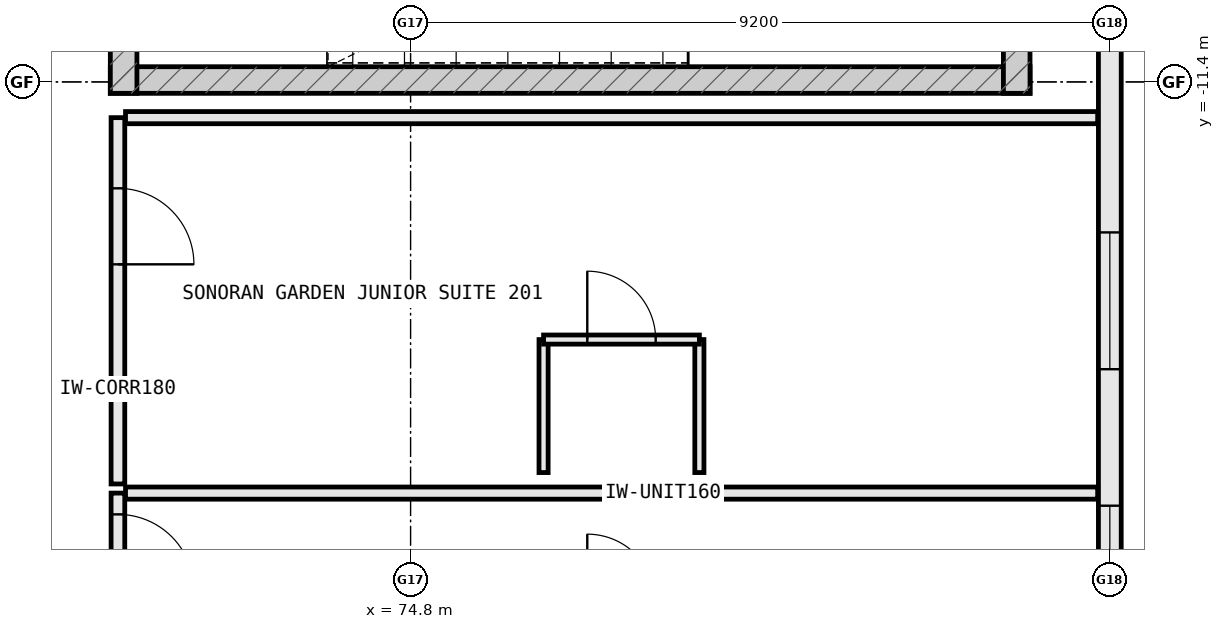
"""IFC4 building model, lengths in metres.
Left out: names, types, materials, properties, quantities, classifications, styles, units other than length and angle.
Written with IfcOpenShell. Run it as: python <this file> out.ifc"""

import sys

from ifc_helpers import new_model, si_unit, direction, frame, frame_2d, origin, place, context, subcontext, project, spatial, rectangle, extrude, element, fill, save


model = new_model("IFC4")
c1 = context("Model", 3, precision=1e-05, world=origin(), true_north=direction((0.0, 1.0)))
c2 = subcontext(c1, "Body", "Model", "MODEL_VIEW")
j1 = project(units=[si_unit("LENGTHUNIT", "METRE"), si_unit("PLANEANGLEUNIT", "RADIAN")], contexts=[c1])
p1 = place(None, origin())
s1 = spatial("IfcSite", under=j1, at=p1, CompositionType="ELEMENT")
p2 = place(p1, origin())
s2 = spatial("IfcBuilding", under=s1, at=p2, CompositionType="ELEMENT")
p3 = place(p2, frame((0.0, 0.0, 27.6)))
s3 = spatial("IfcBuildingStorey", under=s2, at=p3, CompositionType="ELEMENT", Elevation=27.6)
p4 = place(p3, frame((84.0, -18.342, 0.0), z_axis=(0.0, 0.0, 1.0), x_axis=(0.0, 1.0, 0.0)))
e1 = element("IfcWall", 1, at=p4, inside=s3, PredefinedType="STANDARD", context=c2, shape_type="SweptSolid", body=[
    extrude(rectangle(XDim=9.084, YDim=0.3, at=frame_2d((4.542, 0.0))), origin(), (0.0, 0.0, 1.0), 2.97),
])
p5 = place(p4, frame((0.166, 0.0, 0.85)))
e2 = element("IfcOpeningElement", 2, at=p5, cuts=e1, PredefinedType="OPENING", context=c2, shape_type="SweptSolid", body=[
    extrude(rectangle(XDim=1.2, YDim=1.55, at=frame_2d((0.6, 0.775))), frame((0.0, 0.162, 0.0), z_axis=(0.0, -1.0, 0.0), x_axis=(1.0, 0.0, 0.0)), (0.0, 0.0, 1.0), 0.324),
])
p6 = place(p4, frame((3.162, 0.0, 0.85)))
e3 = element("IfcOpeningElement", 3, at=p6, cuts=e1, PredefinedType="OPENING", context=c2, shape_type="SweptSolid", body=[
    extrude(rectangle(XDim=1.8, YDim=1.85, at=frame_2d((0.9, 0.925))), frame((0.0, 0.162, 0.0), z_axis=(0.0, -1.0, 0.0), x_axis=(1.0, 0.0, 0.0)), (0.0, 0.0, 1.0), 0.324),
])
p7 = place(p3, frame((70.85, -11.375, 0.0), z_axis=(0.0, 0.0, 1.0), x_axis=(1.0, 0.0, 0.0)))
e4 = element("IfcWall", 4, at=p7, inside=s3, PredefinedType="SHEAR", context=c2, shape_type="SweptSolid", body=[
    extrude(rectangle(XDim=12.1, YDim=0.35, at=frame_2d((6.05, 0.0))), origin(), (0.0, 0.0, 1.0), 3.8),
])
p8 = place(p3, frame((82.775, -11.55, 0.0), z_axis=(0.0, 0.0, 1.0), x_axis=(0.0, 1.0, 0.0)))
e5 = element("IfcWall", 5, at=p8, inside=s3, PredefinedType="SHEAR", context=c2, shape_type="SweptSolid", body=[
    extrude(rectangle(XDim=5.1, YDim=0.35, at=frame_2d((2.55, 0.0))), origin(), (0.0, 0.0, 1.0), 3.8),
])
p9 = place(p3, frame((71.025, -6.45, 0.0), z_axis=(0.0, 0.0, 1.0), x_axis=(0.0, -1.0, 0.0)))
e6 = element("IfcWall", 6, at=p9, inside=s3, PredefinedType="SHEAR", context=c2, shape_type="SweptSolid", body=[
    extrude(rectangle(XDim=5.1, YDim=0.35, at=frame_2d((2.55, 0.0))), origin(), (0.0, 0.0, 1.0), 3.8),
])
p10 = place(p9, frame((2.0, 0.0, 0.0)))
e7 = element("IfcOpeningElement", 7, at=p10, cuts=e6, PredefinedType="OPENING", context=c2, shape_type="SweptSolid", body=[
    extrude(rectangle(XDim=1.1, YDim=2.2, at=frame_2d((0.55, 1.1))), frame((0.0, 0.187, 0.0), z_axis=(0.0, -1.0, 0.0), x_axis=(1.0, 0.0, 0.0)), (0.0, 0.0, 1.0), 0.374),
])
p11 = place(p3, frame((70.95, -16.81, 0.0), z_axis=(0.0, 0.0, 1.0), x_axis=(0.0, -1.0, 0.0)))
e8 = element("IfcWall", 8, at=p11, inside=s3, PredefinedType="PARTITIONING", context=c2, shape_type="SweptSolid", body=[
    extrude(rectangle(XDim=3.34, YDim=0.18, at=frame_2d((1.67, 0.0))), origin(), (0.0, 0.0, 1.0), 3.555),
])
p12 = place(p11, frame((0.28, 0.0, 0.0)))
e9 = element("IfcOpeningElement", 9, at=p12, cuts=e8, PredefinedType="OPENING", context=c2, shape_type="SweptSolid", body=[
    extrude(rectangle(XDim=1.0, YDim=2.2, at=frame_2d((0.5, 1.1))), frame((0.0, 0.102, 0.0), z_axis=(0.0, -1.0, 0.0), x_axis=(1.0, 0.0, 0.0)), (0.0, 0.0, 1.0), 0.204),
])
p13 = place(p3, frame((71.05, -16.81, 0.0), z_axis=(0.0, 0.0, 1.0), x_axis=(1.0, 0.0, 0.0)))
e10 = element("IfcWall", 10, at=p13, inside=s3, PredefinedType="PARTITIONING", context=c2, shape_type="SweptSolid", body=[
    extrude(rectangle(XDim=12.79, YDim=0.16, at=frame_2d((6.395, 0.0))), origin(), (0.0, 0.0, 1.0), 3.555),
])
p14 = place(p3, frame((70.95, -11.87, 0.0), z_axis=(0.0, 0.0, 1.0), x_axis=(0.0, -1.0, 0.0)))
e11 = element("IfcWall", 11, at=p14, inside=s3, PredefinedType="PARTITIONING", context=c2, shape_type="SweptSolid", body=[
    extrude(rectangle(XDim=4.82, YDim=0.18, at=frame_2d((2.41, 0.0))), origin(), (0.0, 0.0, 1.0), 3.555),
])
p15 = place(p14, frame((0.93, 0.0, 0.0)))
e12 = element("IfcOpeningElement", 12, at=p15, cuts=e11, PredefinedType="OPENING", context=c2, shape_type="SweptSolid", body=[
    extrude(rectangle(XDim=1.0, YDim=2.2, at=frame_2d((0.5, 1.1))), frame((0.0, 0.102, 0.0), z_axis=(0.0, -1.0, 0.0), x_axis=(1.0, 0.0, 0.0)), (0.0, 0.0, 1.0), 0.204),
])
p16 = place(p3, frame((71.05, -11.87, 0.0), z_axis=(0.0, 0.0, 1.0), x_axis=(1.0, 0.0, 0.0)))
e13 = element("IfcWall", 13, at=p16, inside=s3, PredefinedType="PARTITIONING", context=c2, shape_type="SweptSolid", body=[
    extrude(rectangle(XDim=12.79, YDim=0.16, at=frame_2d((6.395, 0.0))), origin(), (0.0, 0.0, 1.0), 3.555),
])
for number, where, z_axis, x_axis in (
    (14, (76.55, -16.54, 0.0), (0.0, 0.0, 1.0), (0.0, 1.0, 0.0)),
    (15, (78.6, -16.54, 0.0), (0.0, 0.0, 1.0), (0.0, 1.0, 0.0)),
):
    element("IfcWall", number, at=place(p3, frame(where, z_axis=z_axis, x_axis=x_axis)), inside=s3, PredefinedType="PARTITIONING", context=c2, shape_type="SweptSolid", body=[
        extrude(rectangle(XDim=1.75, YDim=0.12, at=frame_2d((0.875, 0.0))), origin(), (0.0, 0.0, 1.0), 3.555),
    ])
p17 = place(p3, frame((76.55, -14.79, 0.0), z_axis=(0.0, 0.0, 1.0), x_axis=(1.0, 0.0, 0.0)))
e16 = element("IfcWall", 16, at=p17, inside=s3, PredefinedType="PARTITIONING", context=c2, shape_type="SweptSolid", body=[
    extrude(rectangle(XDim=2.05, YDim=0.12, at=frame_2d((1.025, 0.0))), origin(), (0.0, 0.0, 1.0), 3.555),
])
p18 = place(p17, frame((0.575, 0.0, 0.0)))
e17 = element("IfcOpeningElement", 17, at=p18, cuts=e16, PredefinedType="OPENING", context=c2, shape_type="SweptSolid", body=[
    extrude(rectangle(XDim=0.9, YDim=2.15, at=frame_2d((0.45, 1.075))), frame((0.0, 0.072, 0.0), z_axis=(0.0, -1.0, 0.0), x_axis=(1.0, 0.0, 0.0)), (0.0, 0.0, 1.0), 0.144),
])
p19 = place(p5, origin())
e18 = element("IfcWindow", 18, at=p19, inside=s3, PartitioningType="SINGLE_PANEL", PredefinedType="WINDOW", context=c2, shape_type="SweptSolid", body=[
    extrude(rectangle(XDim=1.2, YDim=1.55, at=frame_2d((0.6, 0.775))), frame((0.0, 0.03, 0.0), z_axis=(0.0, -1.0, 0.0), x_axis=(1.0, 0.0, 0.0)), (0.0, 0.0, 1.0), 0.06),
])
fill(e2, e18)
p20 = place(p6, origin())
e19 = element("IfcWindow", 19, at=p20, inside=s3, PartitioningType="SINGLE_PANEL", PredefinedType="WINDOW", context=c2, shape_type="SweptSolid", body=[
    extrude(rectangle(XDim=1.8, YDim=1.85, at=frame_2d((0.9, 0.925))), frame((0.0, 0.03, 0.0), z_axis=(0.0, -1.0, 0.0), x_axis=(1.0, 0.0, 0.0)), (0.0, 0.0, 1.0), 0.06),
])
fill(e3, e19)
p21 = place(p12, origin())
e20 = element("IfcDoor", 20, at=p21, inside=s3, OperationType="SINGLE_SWING_RIGHT", PredefinedType="DOOR", context=c2, shape_type="SweptSolid", body=[
    extrude(rectangle(XDim=1.0, YDim=2.2, at=frame_2d((0.5, 1.1))), frame((0.0, 0.025, 0.0), z_axis=(0.0, -1.0, 0.0), x_axis=(1.0, 0.0, 0.0)), (0.0, 0.0, 1.0), 0.05),
])
fill(e9, e20)
p22 = place(p15, origin())
e21 = element("IfcDoor", 21, at=p22, inside=s3, OperationType="SINGLE_SWING_RIGHT", PredefinedType="DOOR", context=c2, shape_type="SweptSolid", body=[
    extrude(rectangle(XDim=1.0, YDim=2.2, at=frame_2d((0.5, 1.1))), frame((0.0, 0.025, 0.0), z_axis=(0.0, -1.0, 0.0), x_axis=(1.0, 0.0, 0.0)), (0.0, 0.0, 1.0), 0.05),
])
fill(e12, e21)
p23 = place(p18, origin())
e22 = element("IfcDoor", 22, at=p23, inside=s3, OperationType="SINGLE_SWING_LEFT", PredefinedType="DOOR", context=c2, shape_type="SweptSolid", body=[
    extrude(rectangle(XDim=0.9, YDim=2.15, at=frame_2d((0.45, 1.075))), frame((0.0, 0.025, 0.0), z_axis=(0.0, -1.0, 0.0), x_axis=(1.0, 0.0, 0.0)), (0.0, 0.0, 1.0), 0.05),
])
fill(e17, e22)
save(model, sys.argv[1])
